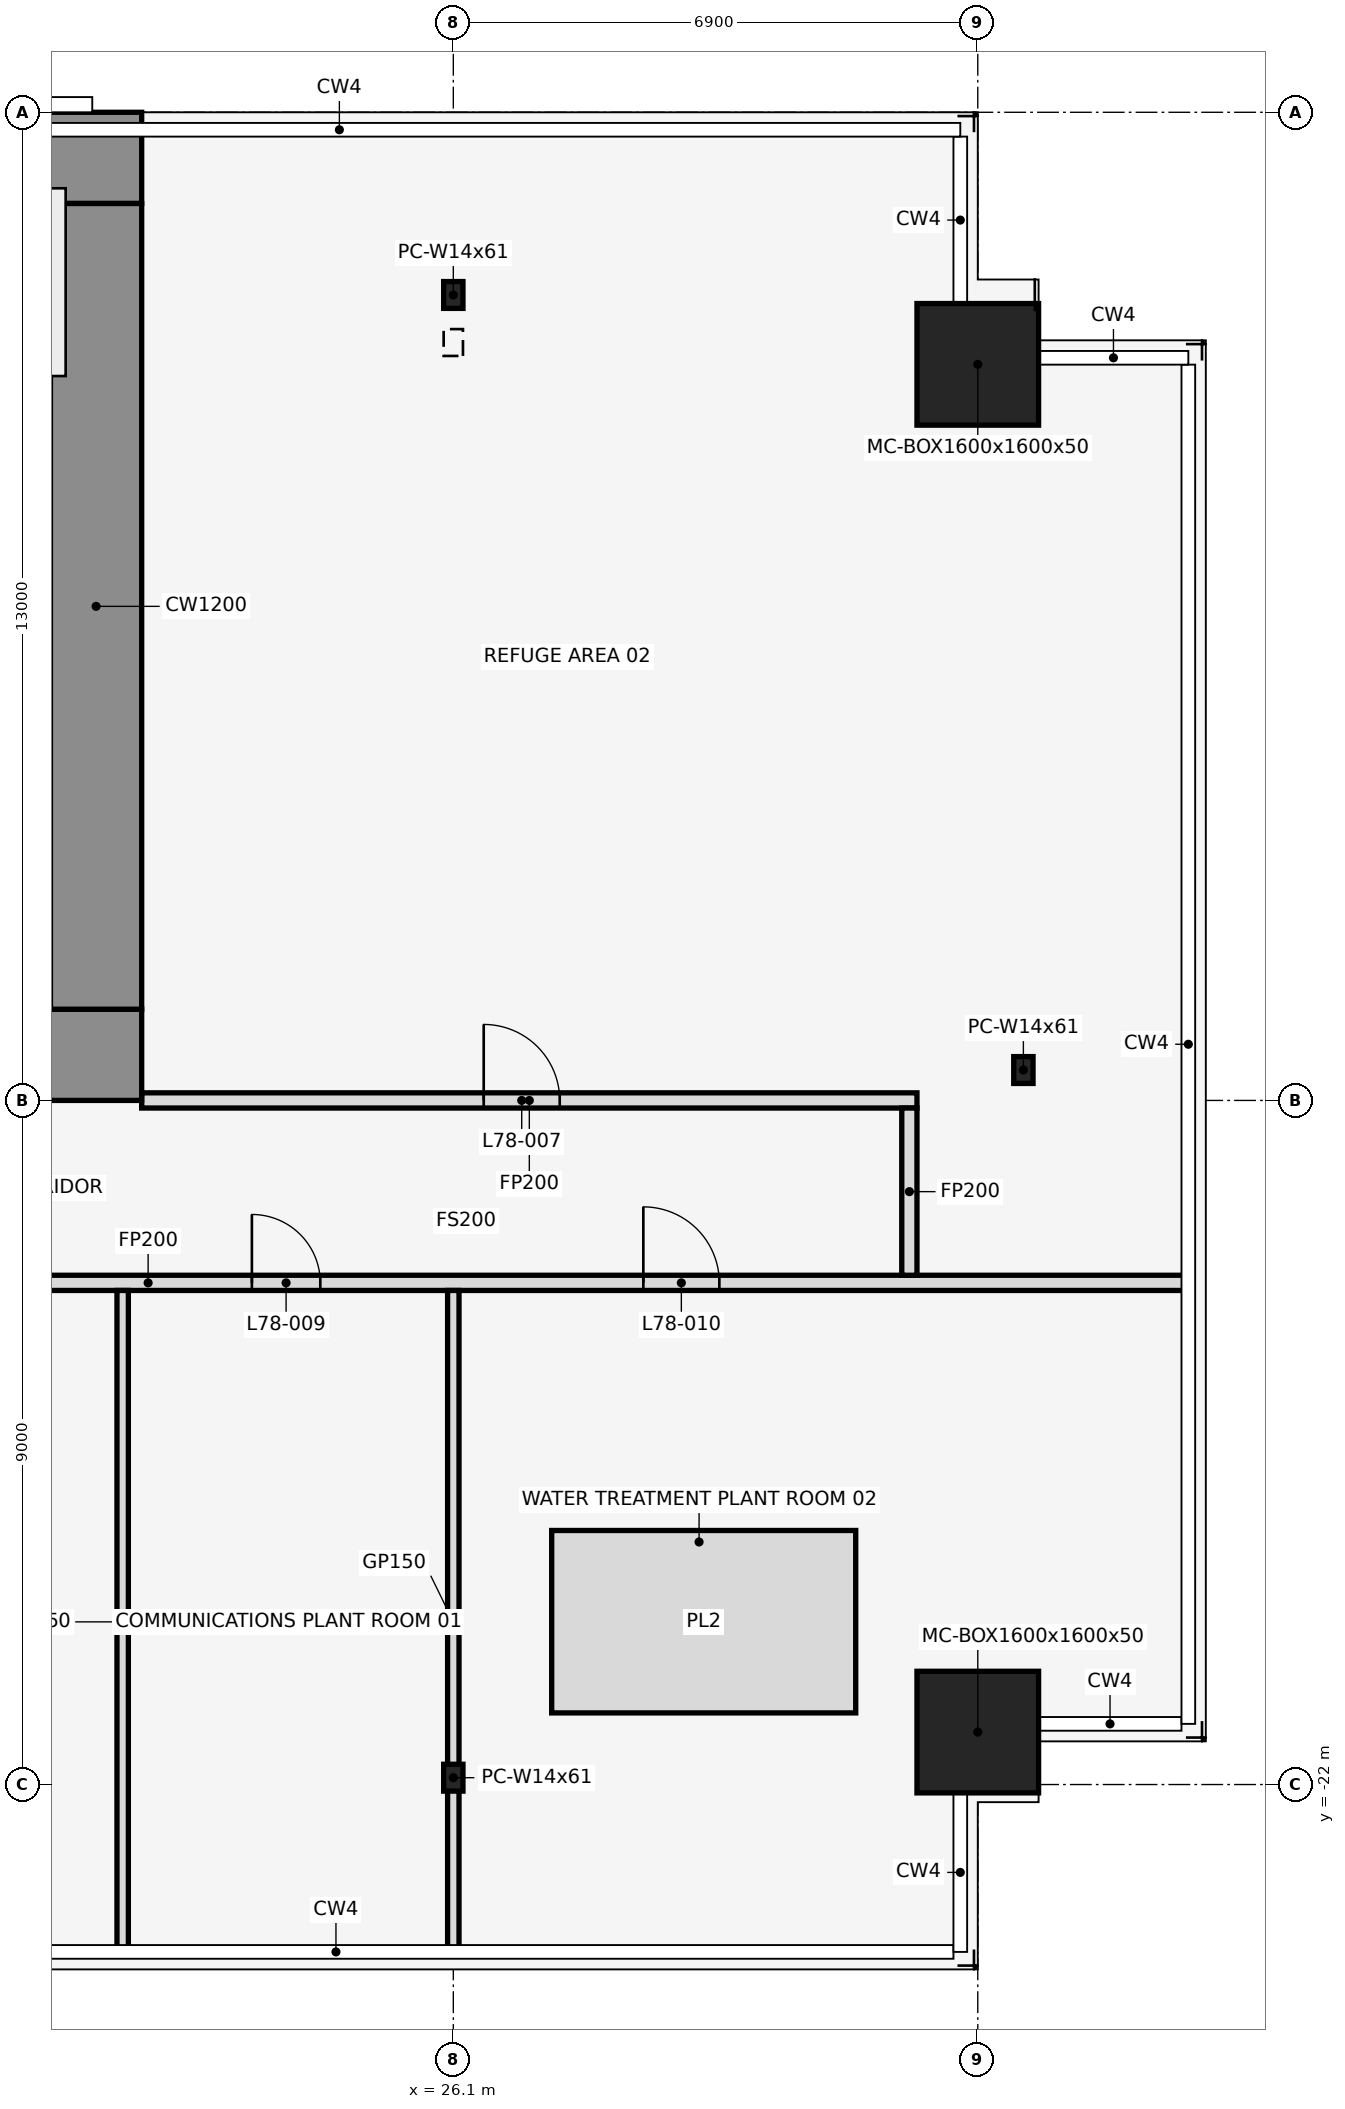
"""IFC4 building model, lengths in metres.
Left out: names, types, materials, properties, quantities, classifications, styles, units other than length and angle.
Written with IfcOpenShell. Run it as: python <this file> out.ifc"""

import sys

from ifc_helpers import new_model, si_unit, direction, frame, frame_2d, origin, origin_2d, place, context, subcontext, project, spatial, rectangle, hollow_rectangle, i_section, extrude, element, fill, save


model = new_model("IFC4")
c1 = context("Model", 3, precision=1e-05, world=origin(), true_north=direction((0.0, 1.0)))
c2 = subcontext(c1, "Body", "Model", "MODEL_VIEW")
j1 = project(units=[si_unit("LENGTHUNIT", "METRE"), si_unit("PLANEANGLEUNIT", "RADIAN")], contexts=[c1])
p1 = place(None, origin())
s1 = spatial("IfcSite", under=j1, at=p1, CompositionType="ELEMENT")
p2 = place(p1, origin())
s2 = spatial("IfcBuilding", under=s1, at=p2, CompositionType="ELEMENT")
p3 = place(p2, frame((0.0, 0.0, 347.9)))
s3 = spatial("IfcBuildingStorey", under=s2, at=p3, CompositionType="ELEMENT", Elevation=347.9)
p4 = place(p3, frame((26.1, -21.91, 0.0), z_axis=(0.0, 0.0, 1.0), x_axis=(1.0, 0.0, 0.0)))
e1 = element("IfcColumn", 1, at=p4, inside=s3, PredefinedType="COLUMN", context=c2, shape_type="SweptSolid", body=[
    extrude(i_section(OverallWidth=0.254, OverallDepth=0.353, WebThickness=0.01, FlangeThickness=0.016, at=origin_2d()), origin(), (0.0, 0.0, 1.0), 4.5),
])
p5 = place(p3, frame((26.1, -2.403, 0.024), z_axis=(0.0, -0.139200740592, 0.990264183851), x_axis=(1.0, 0.0, 0.0)))
e2 = element("IfcColumn", 2, at=p5, inside=s3, PredefinedType="COLUMN", context=c2, shape_type="SweptSolid", body=[
    extrude(i_section(OverallWidth=0.254, OverallDepth=0.353, WebThickness=0.01, FlangeThickness=0.016, at=origin_2d()), origin(), (0.0, 0.0, 1.0), 4.495),
])
for number, where, z_axis, x_axis in (
    (3, (33.0, -21.31, 0.0), (0.0, 0.0, 1.0), (1.0, 0.0, 0.0)),
    (4, (33.0, -3.316, 0.0), (0.0, 0.0, 1.0), (1.0, 0.0, 0.0)),
):
    element("IfcColumn", number, at=place(p3, frame(where, z_axis=z_axis, x_axis=x_axis)), inside=s3, PredefinedType="COLUMN", context=c2, shape_type="SweptSolid", body=[
        extrude(hollow_rectangle(XDim=1.6, YDim=1.6, WallThickness=0.05, at=origin_2d()), origin(), (0.0, 0.0, 1.0), 4.5),
    ])
p6 = place(p3, frame((33.6, -12.6, 0.0), z_axis=(0.0, 0.0, 1.0), x_axis=(1.0, 0.0, 0.0)))
e5 = element("IfcColumn", 5, at=p6, inside=s3, PredefinedType="COLUMN", context=c2, shape_type="SweptSolid", body=[
    extrude(i_section(OverallWidth=0.254, OverallDepth=0.353, WebThickness=0.01, FlangeThickness=0.016, at=origin_2d()), origin(), (0.0, 0.0, 1.0), 4.5),
])
p7 = place(p3, frame((29.394, -19.858, 0.0), z_axis=(0.0, 0.0, 1.0), x_axis=(1.0, 0.0, 0.0)))
e6 = element("IfcWall", 6, at=p7, inside=s3, PredefinedType="USERDEFINED", context=c2, shape_type="SweptSolid", body=[
    extrude(rectangle(XDim=4.0, YDim=2.4, at=origin_2d()), origin(), (0.0, 0.0, 1.0), 0.2),
])
p8 = place(p3, frame((8.38, -15.4, 0.0), z_axis=(0.0, 0.0, 1.0), x_axis=(1.0, 0.0, 0.0)))
e7 = element("IfcWall", 7, at=p8, inside=s3, PredefinedType="PARTITIONING", context=c2, shape_type="SweptSolid", body=[
    extrude(rectangle(XDim=27.41, YDim=0.2, at=frame_2d((13.705, 0.0))), origin(), (0.0, 0.0, 1.0), 3.368),
])
p9 = place(p8, frame((6.32, 0.0, 0.0)))
e8 = element("IfcOpeningElement", 8, at=p9, cuts=e7, PredefinedType="OPENING", context=c2, shape_type="SweptSolid", body=[
    extrude(rectangle(XDim=1.0, YDim=2.1, at=frame_2d((0.5, 1.05))), frame((0.0, 0.112, 0.0), z_axis=(0.0, -1.0, 0.0), x_axis=(1.0, 0.0, 0.0)), (0.0, 0.0, 1.0), 0.224),
])
p10 = place(p8, frame((15.07, 0.0, 0.0)))
e9 = element("IfcOpeningElement", 9, at=p10, cuts=e7, PredefinedType="OPENING", context=c2, shape_type="SweptSolid", body=[
    extrude(rectangle(XDim=0.9, YDim=2.1, at=frame_2d((0.45, 1.05))), frame((0.0, 0.112, 0.0), z_axis=(0.0, -1.0, 0.0), x_axis=(1.0, 0.0, 0.0)), (0.0, 0.0, 1.0), 0.224),
])
p11 = place(p8, frame((20.22, 0.0, 0.0)))
e10 = element("IfcOpeningElement", 10, at=p11, cuts=e7, PredefinedType="OPENING", context=c2, shape_type="SweptSolid", body=[
    extrude(rectangle(XDim=1.0, YDim=2.1, at=frame_2d((0.5, 1.05))), frame((0.0, 0.112, 0.0), z_axis=(0.0, -1.0, 0.0), x_axis=(1.0, 0.0, 0.0)), (0.0, 0.0, 1.0), 0.224),
])
p12 = place(p3, frame((22.0, -13.0, 0.0), z_axis=(0.0, 0.0, 1.0), x_axis=(1.0, 0.0, 0.0)))
e11 = element("IfcWall", 11, at=p12, inside=s3, PredefinedType="PARTITIONING", context=c2, shape_type="SweptSolid", body=[
    extrude(rectangle(XDim=10.2, YDim=0.2, at=frame_2d((5.1, 0.0))), origin(), (0.0, 0.0, 1.0), 3.368),
])
p13 = place(p12, frame((4.5, 0.0, 0.0)))
e12 = element("IfcOpeningElement", 12, at=p13, cuts=e11, PredefinedType="OPENING", context=c2, shape_type="SweptSolid", body=[
    extrude(rectangle(XDim=1.0, YDim=2.1, at=frame_2d((0.5, 1.05))), frame((0.0, 0.112, 0.0), z_axis=(0.0, -1.0, 0.0), x_axis=(1.0, 0.0, 0.0)), (0.0, 0.0, 1.0), 0.224),
])
for number, where, z_axis, x_axis in (
    (13, (21.75, -24.22, 0.0), (0.0, 0.0, 1.0), (0.0, 1.0, 0.0)),
    (14, (26.1, -24.22, 0.0), (0.0, 0.0, 1.0), (0.0, 1.0, 0.0)),
):
    element("IfcWall", number, at=place(p3, frame(where, z_axis=z_axis, x_axis=x_axis)), inside=s3, PredefinedType="PARTITIONING", context=c2, shape_type="SweptSolid", body=[
        extrude(rectangle(XDim=8.72, YDim=0.15, at=frame_2d((4.36, 0.0))), origin(), (0.0, 0.0, 1.0), 3.368),
    ])
p14 = place(p3, frame((32.1, -15.3, 0.0), z_axis=(0.0, 0.0, 1.0), x_axis=(0.0, 1.0, 0.0)))
e15 = element("IfcWall", 15, at=p14, inside=s3, PredefinedType="PARTITIONING", context=c2, shape_type="SweptSolid", body=[
    extrude(rectangle(XDim=2.2, YDim=0.2, at=frame_2d((1.1, 0.0))), origin(), (0.0, 0.0, 1.0), 3.368),
])
p15 = place(p3, frame((8.3, -0.6, 0.0), z_axis=(0.0, 0.0, 1.0), x_axis=(1.0, 0.0, 0.0)))
e16 = element("IfcWall", 16, at=p15, inside=s3, PredefinedType="SHEAR", context=c2, shape_type="SweptSolid", body=[
    extrude(rectangle(XDim=13.7, YDim=1.2, at=frame_2d((6.85, 0.0))), origin(), (0.0, 0.0, 1.0), 4.5),
])
p16 = place(p3, frame((8.3, -12.4, 0.0), z_axis=(0.0, 0.0, 1.0), x_axis=(1.0, 0.0, 0.0)))
e17 = element("IfcWall", 17, at=p16, inside=s3, PredefinedType="SHEAR", context=c2, shape_type="SweptSolid", body=[
    extrude(rectangle(XDim=13.7, YDim=1.2, at=frame_2d((6.85, 0.0))), origin(), (0.0, 0.0, 1.0), 4.5),
])
p17 = place(p16, frame((10.3, 0.0, 0.0)))
e18 = element("IfcOpeningElement", 18, at=p17, cuts=e17, PredefinedType="OPENING", context=c2, shape_type="SweptSolid", body=[
    extrude(rectangle(XDim=1.2, YDim=2.1, at=frame_2d((0.6, 1.05))), frame((0.0, 0.612, 0.0), z_axis=(0.0, -1.0, 0.0), x_axis=(1.0, 0.0, 0.0)), (0.0, 0.0, 1.0), 1.224),
])
p18 = place(p16, frame((6.2, 0.0, 0.0)))
e19 = element("IfcOpeningElement", 19, at=p18, cuts=e17, PredefinedType="OPENING", context=c2, shape_type="SweptSolid", body=[
    extrude(rectangle(XDim=1.2, YDim=2.1, at=frame_2d((0.6, 1.05))), frame((0.0, 0.612, 0.0), z_axis=(0.0, -1.0, 0.0), x_axis=(1.0, 0.0, 0.0)), (0.0, 0.0, 1.0), 1.224),
])
p19 = place(p3, frame((21.4, -11.8, 0.0), z_axis=(0.0, 0.0, 1.0), x_axis=(0.0, 1.0, 0.0)))
e20 = element("IfcWall", 20, at=p19, inside=s3, PredefinedType="SHEAR", context=c2, shape_type="SweptSolid", body=[
    extrude(rectangle(XDim=10.6, YDim=1.2, at=frame_2d((5.3, 0.0))), origin(), (0.0, 0.0, 1.0), 4.5),
])
p20 = place(p13, origin())
e21 = element("IfcDoor", 21, at=p20, inside=s3, OperationType="SINGLE_SWING_LEFT", PredefinedType="DOOR", context=c2, shape_type="SweptSolid", body=[
    extrude(rectangle(XDim=1.0, YDim=2.1, at=frame_2d((0.5, 1.05))), frame((0.0, 0.025, 0.0), z_axis=(0.0, -1.0, 0.0), x_axis=(1.0, 0.0, 0.0)), (0.0, 0.0, 1.0), 0.05),
])
fill(e12, e21)
p21 = place(p10, frame((0.9, 0.0, 0.0), z_axis=(0.0, 0.0, 1.0), x_axis=(-1.0, 0.0, 0.0)))
e22 = element("IfcDoor", 22, at=p21, inside=s3, OperationType="SINGLE_SWING_RIGHT", PredefinedType="DOOR", context=c2, shape_type="SweptSolid", body=[
    extrude(rectangle(XDim=0.9, YDim=2.1, at=frame_2d((0.45, 1.05))), frame((0.0, 0.025, 0.0), z_axis=(0.0, -1.0, 0.0), x_axis=(1.0, 0.0, 0.0)), (0.0, 0.0, 1.0), 0.05),
])
fill(e9, e22)
p22 = place(p11, frame((1.0, 0.0, 0.0), z_axis=(0.0, 0.0, 1.0), x_axis=(-1.0, 0.0, 0.0)))
e23 = element("IfcDoor", 23, at=p22, inside=s3, OperationType="SINGLE_SWING_LEFT", PredefinedType="DOOR", context=c2, shape_type="SweptSolid", body=[
    extrude(rectangle(XDim=1.0, YDim=2.1, at=frame_2d((0.5, 1.05))), frame((0.0, 0.025, 0.0), z_axis=(0.0, -1.0, 0.0), x_axis=(1.0, 0.0, 0.0)), (0.0, 0.0, 1.0), 0.05),
])
fill(e10, e23)
save(model, sys.argv[1])
